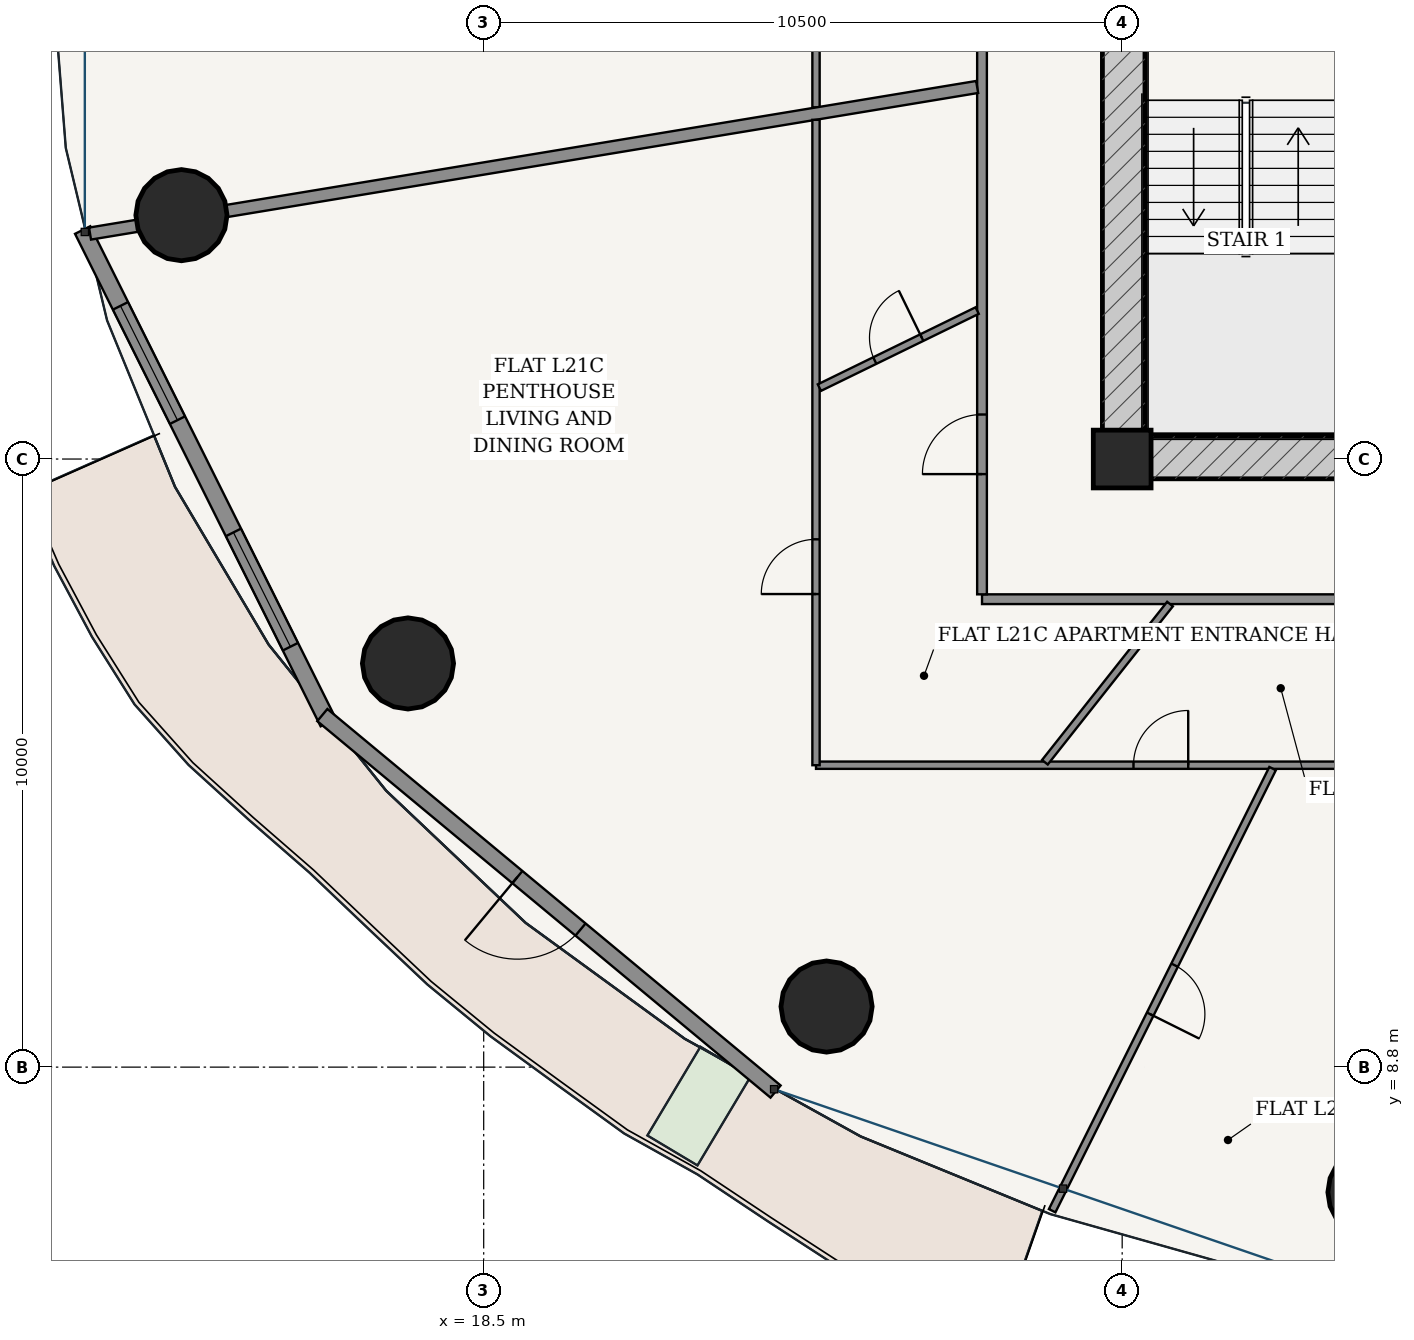
"""IFC4 building model, lengths in metres.
Left out: names, types, materials, properties, quantities, classifications, styles, units other than length and angle.
Written with IfcOpenShell. Run it as: python <this file> out.ifc"""

import sys

from ifc_helpers import new_model, si_unit, direction, frame, frame_2d, origin, origin_2d, place, context, subcontext, project, spatial, rectangle, hollow_circle, extrude, source, transform, mapped, element, fill, save


model = new_model("IFC4")
c1 = context("Model", 3, precision=1e-05, world=origin(), true_north=direction((-0.2419218956, 0.970295726276)))
c2 = subcontext(c1, "Body", "Model", "MODEL_VIEW")
j1 = project(units=[si_unit("LENGTHUNIT", "METRE"), si_unit("PLANEANGLEUNIT", "RADIAN")], contexts=[c1])
p1 = place(None, origin())
s1 = spatial("IfcSite", under=j1, at=p1, CompositionType="ELEMENT")
p2 = place(p1, origin())
s2 = spatial("IfcBuilding", under=s1, at=p2, CompositionType="ELEMENT")
p3 = place(p2, frame((0.0, 0.0, 83.4)))
s3 = spatial("IfcBuildingStorey", under=s2, at=p3, CompositionType="ELEMENT", Elevation=83.4)
p4 = place(p3, frame((29.0, 18.8, 0.0), z_axis=(0.0, 0.0, 1.0), x_axis=(1.0, 0.0, 0.0)))
e1 = element("IfcColumn", 1, at=p4, inside=s3, PredefinedType="COLUMN", context=c2, shape_type="SweptSolid", body=[
    extrude(rectangle(XDim=0.95, YDim=0.95, at=origin_2d()), origin(), (0.0, 0.0, 1.0), 3.6),
])
p5 = place(p3, frame((28.675, 18.825, 0.0), z_axis=(0.0, 0.0, 1.0), x_axis=(1.0, 0.0, 0.0)))
e2 = element("IfcWall", 2, at=p5, inside=s3, PredefinedType="SHEAR", context=c2, shape_type="SweptSolid", body=[
    extrude(rectangle(XDim=18.65, YDim=0.7, at=frame_2d((9.325, 0.0))), origin(), (0.0, 0.0, 1.0), 3.325),
])
p6 = place(p5, frame((7.577, 0.0, 0.0)))
e3 = element("IfcOpeningElement", 3, at=p6, cuts=e2, PredefinedType="OPENING", context=c2, shape_type="SweptSolid", body=[
    extrude(rectangle(XDim=0.85, YDim=2.1, at=frame_2d((0.425, 1.05))), frame((0.0, 0.36, 0.0), z_axis=(0.0, -1.0, 0.0), x_axis=(1.0, 0.0, 0.0)), (0.0, 0.0, 1.0), 0.72),
])
p7 = place(p5, frame((10.623, 0.0, 0.0)))
e4 = element("IfcOpeningElement", 4, at=p7, cuts=e2, PredefinedType="OPENING", context=c2, shape_type="SweptSolid", body=[
    extrude(rectangle(XDim=0.85, YDim=2.1, at=frame_2d((0.425, 1.05))), frame((0.0, 0.36, 0.0), z_axis=(0.0, -1.0, 0.0), x_axis=(1.0, 0.0, 0.0)), (0.0, 0.0, 1.0), 0.72),
])
p8 = place(p3, frame((29.025, 19.175, 0.0), z_axis=(0.0, 0.0, 1.0), x_axis=(0.0, 1.0, 0.0)))
e5 = element("IfcWall", 5, at=p8, inside=s3, PredefinedType="SHEAR", context=c2, shape_type="SweptSolid", body=[
    extrude(rectangle(XDim=15.25, YDim=0.7, at=frame_2d((7.625, 0.0))), origin(), (0.0, 0.0, 1.0), 3.325),
])
p9 = place(p8, frame((9.875, 0.0, 0.0)))
e6 = element("IfcOpeningElement", 6, at=p9, cuts=e5, PredefinedType="OPENING", context=c2, shape_type="SweptSolid", body=[
    extrude(rectangle(XDim=1.5, YDim=2.2, at=frame_2d((0.75, 1.1))), frame((0.0, 0.36, 0.0), z_axis=(0.0, -1.0, 0.0), x_axis=(1.0, 0.0, 0.0)), (0.0, 0.0, 1.0), 0.72),
])
for number, where, z_axis, x_axis in (
    (7, (13.529, 22.81, 0.0), (0.0, 0.0, 1.0), (1.0, 0.0, 0.0)),
    (8, (17.255, 15.438, 0.0), (0.0, 0.0, 1.0), (1.0, 0.0, 0.0)),
    (9, (24.138, 9.796, 0.0), (0.0, 0.0, 1.0), (1.0, 0.0, 0.0)),
    (10, (33.133, 6.743, 0.0), (0.0, 0.0, 1.0), (1.0, 0.0, 0.0)),
):
    element("IfcColumn", number, at=place(p3, frame(where, z_axis=z_axis, x_axis=x_axis)), inside=s3, PredefinedType="COLUMN", context=c2, shape_type="SweptSolid", body=[
        extrude(hollow_circle(Radius=0.75, WallThickness=0.045, at=origin_2d()), origin(), (0.0, 0.0, 1.0), 3.6),
    ])
p10 = place(p3, frame((11.905, 22.566, 0.0), z_axis=(0.0, 0.0, 1.0), x_axis=(0.446274562077, -0.894896091869, 0.0)))
e11 = element("IfcWall", 11, at=p10, inside=s3, PredefinedType="SOLIDWALL", context=c2, shape_type="SweptSolid", body=[
    extrude(rectangle(XDim=9.05, YDim=0.28, at=frame_2d((4.525, 0.0))), origin(), (0.0, 0.0, 1.0), 3.325),
])
p11 = place(p10, frame((1.394, 0.0, 0.85)))
e12 = element("IfcOpeningElement", 12, at=p11, cuts=e11, PredefinedType="OPENING", context=c2, shape_type="SweptSolid", body=[
    extrude(rectangle(XDim=2.1, YDim=1.95, at=frame_2d((1.05, 0.975))), frame((0.0, 0.15, 0.0), z_axis=(0.0, -1.0, 0.0), x_axis=(1.0, 0.0, 0.0)), (0.0, 0.0, 1.0), 0.3),
])
p12 = place(p10, frame((5.557, 0.0, 0.85)))
e13 = element("IfcOpeningElement", 13, at=p12, cuts=e11, PredefinedType="OPENING", context=c2, shape_type="SweptSolid", body=[
    extrude(rectangle(XDim=2.1, YDim=1.95, at=frame_2d((1.05, 0.975))), frame((0.0, 0.15, 0.0), z_axis=(0.0, -1.0, 0.0), x_axis=(1.0, 0.0, 0.0)), (0.0, 0.0, 1.0), 0.3),
])
p13 = place(p3, frame((15.846, 14.59, 0.0), z_axis=(0.0, 0.0, 1.0), x_axis=(0.769254958887, -0.638941944333, 0.0)))
e14 = element("IfcWall", 14, at=p13, inside=s3, PredefinedType="SOLIDWALL", context=c2, shape_type="SweptSolid", body=[
    extrude(rectangle(XDim=9.69, YDim=0.26, at=frame_2d((4.845, 0.0))), origin(), (0.0, 0.0, 1.0), 3.325),
])
p14 = place(p13, frame((4.17, 0.0, 0.0)))
e15 = element("IfcOpeningElement", 15, at=p14, cuts=e14, PredefinedType="OPENING", context=c2, shape_type="SweptSolid", body=[
    extrude(rectangle(XDim=1.35, YDim=2.2, at=frame_2d((0.675, 1.1))), frame((0.0, 0.14, 0.0), z_axis=(0.0, -1.0, 0.0), x_axis=(1.0, 0.0, 0.0)), (0.0, 0.0, 1.0), 0.28),
])
p15 = place(p3, frame((26.695, 16.495, 0.0), z_axis=(0.0, 0.0, 1.0), x_axis=(1.0, 0.0, 0.0)))
e16 = element("IfcWall", 16, at=p15, inside=s3, PredefinedType="PARTITIONING", context=c2, shape_type="SweptSolid", body=[
    extrude(rectangle(XDim=22.61, YDim=0.16, at=frame_2d((11.305, 0.0))), origin(), (0.0, 0.0, 1.0), 2.767),
])
p16 = place(p3, frame((26.695, 16.575, 0.0), z_axis=(0.0, 0.0, 1.0), x_axis=(0.0, 1.0, 0.0)))
e17 = element("IfcWall", 17, at=p16, inside=s3, PredefinedType="PARTITIONING", context=c2, shape_type="SweptSolid", body=[
    extrude(rectangle(XDim=20.45, YDim=0.16, at=frame_2d((10.225, 0.0))), origin(), (0.0, 0.0, 1.0), 2.767),
])
p17 = place(p16, frame((1.977, 0.0, 0.0)))
e18 = element("IfcOpeningElement", 18, at=p17, cuts=e17, PredefinedType="OPENING", context=c2, shape_type="SweptSolid", body=[
    extrude(rectangle(XDim=0.98, YDim=2.2, at=frame_2d((0.49, 1.1))), frame((0.0, 0.09, 0.0), z_axis=(0.0, -1.0, 0.0), x_axis=(1.0, 0.0, 0.0)), (0.0, 0.0, 1.0), 0.18),
])
p18 = place(p3, frame((23.965, 24.583, 0.0), z_axis=(0.0, 0.0, 1.0), x_axis=(0.0, 1.0, 0.0)))
e19 = element("IfcWall", 19, at=p18, inside=s3, PredefinedType="PARTITIONING", context=c2, shape_type="SweptSolid", body=[
    extrude(rectangle(XDim=15.252, YDim=0.12, at=frame_2d((7.626, 0.0))), origin(), (0.0, 0.0, 1.0), 2.767),
])
p19 = place(p3, frame((26.615, 24.918, 0.0), z_axis=(0.0, 0.0, 1.0), x_axis=(-0.986618789677, -0.163044054958, 0.0)))
e20 = element("IfcWall", 20, at=p19, inside=s3, PredefinedType="PARTITIONING", context=c2, shape_type="SweptSolid", body=[
    extrude(rectangle(XDim=14.787, YDim=0.2, at=frame_2d((7.393, 0.0))), origin(), (0.0, 0.0, 1.0), 2.767),
])
p20 = place(p3, frame((41.019, 13.765, 0.0), z_axis=(0.0, 0.0, 1.0), x_axis=(-1.0, 0.0, 0.0)))
e21 = element("IfcWall", 21, at=p20, inside=s3, PredefinedType="PARTITIONING", context=c2, shape_type="SweptSolid", body=[
    extrude(rectangle(XDim=17.054, YDim=0.12, at=frame_2d((8.527, 0.0))), origin(), (0.0, 0.0, 1.0), 2.767),
])
p21 = place(p20, frame((10.933, 0.0, 0.0)))
e22 = element("IfcOpeningElement", 22, at=p21, cuts=e21, PredefinedType="OPENING", context=c2, shape_type="SweptSolid", body=[
    extrude(rectangle(XDim=0.9, YDim=2.15, at=frame_2d((0.45, 1.075))), frame((0.0, 0.07, 0.0), z_axis=(0.0, -1.0, 0.0), x_axis=(1.0, 0.0, 0.0)), (0.0, 0.0, 1.0), 0.14),
])
p22 = place(p3, frame((23.965, 13.765, 0.0), z_axis=(0.0, 0.0, 1.0), x_axis=(0.0, 1.0, 0.0)))
e23 = element("IfcWall", 23, at=p22, inside=s3, PredefinedType="PARTITIONING", context=c2, shape_type="SweptSolid", body=[
    extrude(rectangle(XDim=10.614, YDim=0.12, at=frame_2d((5.307, 0.0))), origin(), (0.0, 0.0, 1.0), 2.767),
])
p23 = place(p22, frame((2.815, 0.0, 0.0)))
e24 = element("IfcOpeningElement", 24, at=p23, cuts=e23, PredefinedType="OPENING", context=c2, shape_type="SweptSolid", body=[
    extrude(rectangle(XDim=0.9, YDim=2.15, at=frame_2d((0.45, 1.075))), frame((0.0, 0.07, 0.0), z_axis=(0.0, -1.0, 0.0), x_axis=(1.0, 0.0, 0.0)), (0.0, 0.0, 1.0), 0.14),
])
p24 = place(p3, frame((31.474, 13.709, 0.0), z_axis=(0.0, 0.0, 1.0), x_axis=(-0.446179583353, -0.894943450392, 0.0)))
e25 = element("IfcWall", 25, at=p24, inside=s3, PredefinedType="PARTITIONING", context=c2, shape_type="SweptSolid", body=[
    extrude(rectangle(XDim=8.125, YDim=0.12, at=frame_2d((4.062, 0.0))), origin(), (0.0, 0.0, 1.0), 2.767),
])
p25 = place(p24, frame((3.612, 0.0, 0.0)))
e26 = element("IfcOpeningElement", 26, at=p25, cuts=e25, PredefinedType="OPENING", context=c2, shape_type="SweptSolid", body=[
    extrude(rectangle(XDim=0.9, YDim=2.15, at=frame_2d((0.45, 1.075))), frame((0.0, 0.07, 0.0), z_axis=(0.0, -1.0, 0.0), x_axis=(1.0, 0.0, 0.0)), (0.0, 0.0, 1.0), 0.14),
])
p26 = place(p3, frame((26.615, 21.241, 0.0), z_axis=(0.0, 0.0, 1.0), x_axis=(-0.898615592274, -0.438736842906, 0.0)))
e27 = element("IfcWall", 27, at=p26, inside=s3, PredefinedType="PARTITIONING", context=c2, shape_type="SweptSolid", body=[
    extrude(rectangle(XDim=2.887, YDim=0.12, at=frame_2d((1.443, 0.0))), origin(), (0.0, 0.0, 1.0), 3.325),
])
p27 = place(p26, frame((1.013, 0.0, 0.0)))
e28 = element("IfcOpeningElement", 28, at=p27, cuts=e27, PredefinedType="OPENING", context=c2, shape_type="SweptSolid", body=[
    extrude(rectangle(XDim=0.86, YDim=2.15, at=frame_2d((0.43, 1.075))), frame((0.0, 0.07, 0.0), z_axis=(0.0, -1.0, 0.0), x_axis=(1.0, 0.0, 0.0)), (0.0, 0.0, 1.0), 0.14),
])
p28 = place(p3, frame((29.787, 16.415, 0.0), z_axis=(0.0, 0.0, 1.0), x_axis=(-0.62033143471, -0.784339793145, 0.0)))
e29 = element("IfcWall", 29, at=p28, inside=s3, PredefinedType="PARTITIONING", context=c2, shape_type="SweptSolid", body=[
    extrude(rectangle(XDim=3.317, YDim=0.12, at=frame_2d((1.658, 0.0))), origin(), (0.0, 0.0, 1.0), 3.004),
])
m1 = source(origin(), c2, "Body", "SweptSolid", [
    extrude(rectangle(XDim=2.1, YDim=1.95, at=frame_2d((1.05, 0.975))), frame((0.0, 0.03, 0.0), z_axis=(0.0, -1.0, 0.0), x_axis=(1.0, 0.0, 0.0)), (0.0, 0.0, 1.0), 0.06),
])
p29 = place(p11, origin())
e30 = element("IfcWindow", 30, at=p29, inside=s3, PartitioningType="SINGLE_PANEL", PredefinedType="WINDOW", context=c2, shape_type="MappedRepresentation", body=[
    mapped(m1, transform((0.0, 0.0, 0.0), scale=1.0)),
])
fill(e12, e30)
p30 = place(p12, origin())
e31 = element("IfcWindow", 31, at=p30, inside=s3, PartitioningType="SINGLE_PANEL", PredefinedType="WINDOW", context=c2, shape_type="MappedRepresentation", body=[
    mapped(m1, transform((0.0, 0.0, 0.0), scale=1.0)),
])
fill(e13, e31)
m2 = source(origin(), c2, "Body", "SweptSolid", [
    extrude(rectangle(XDim=1.35, YDim=2.2, at=frame_2d((0.675, 1.1))), frame((0.0, 0.025, 0.0), z_axis=(0.0, -1.0, 0.0), x_axis=(1.0, 0.0, 0.0)), (0.0, 0.0, 1.0), 0.05),
])
p31 = place(p14, frame((1.35, 0.0, 0.0), z_axis=(0.0, 0.0, 1.0), x_axis=(-1.0, 0.0, 0.0)))
e32 = element("IfcDoor", 32, at=p31, inside=s3, OperationType="SINGLE_SWING_RIGHT", PredefinedType="DOOR", context=c2, shape_type="MappedRepresentation", body=[
    mapped(m2, transform((0.0, 0.0, 0.0), scale=1.0)),
])
fill(e15, e32)
m3 = source(origin(), c2, "Body", "SweptSolid", [
    extrude(rectangle(XDim=0.98, YDim=2.2, at=frame_2d((0.49, 1.1))), frame((0.0, 0.025, 0.0), z_axis=(0.0, -1.0, 0.0), x_axis=(1.0, 0.0, 0.0)), (0.0, 0.0, 1.0), 0.05),
])
p32 = place(p17, origin())
e33 = element("IfcDoor", 33, at=p32, inside=s3, OperationType="SINGLE_SWING_LEFT", PredefinedType="DOOR", context=c2, shape_type="MappedRepresentation", body=[
    mapped(m3, transform((0.0, 0.0, 0.0), scale=1.0)),
])
fill(e18, e33)
m4 = source(origin(), c2, "Body", "SweptSolid", [
    extrude(rectangle(XDim=0.86, YDim=2.15, at=frame_2d((0.43, 1.075))), frame((0.0, 0.025, 0.0), z_axis=(0.0, -1.0, 0.0), x_axis=(1.0, 0.0, 0.0)), (0.0, 0.0, 1.0), 0.05),
])
p33 = place(p27, frame((0.86, 0.0, 0.0), z_axis=(0.0, 0.0, 1.0), x_axis=(-1.0, 0.0, 0.0)))
e34 = element("IfcDoor", 34, at=p33, inside=s3, OperationType="SINGLE_SWING_RIGHT", PredefinedType="DOOR", context=c2, shape_type="MappedRepresentation", body=[
    mapped(m4, transform((0.0, 0.0, 0.0), scale=1.0)),
])
fill(e28, e34)
m5 = source(origin(), c2, "Body", "SweptSolid", [
    extrude(rectangle(XDim=0.9, YDim=2.15, at=frame_2d((0.45, 1.075))), frame((0.0, 0.025, 0.0), z_axis=(0.0, -1.0, 0.0), x_axis=(1.0, 0.0, 0.0)), (0.0, 0.0, 1.0), 0.05),
])
p34 = place(p23, origin())
e35 = element("IfcDoor", 35, at=p34, inside=s3, OperationType="SINGLE_SWING_LEFT", PredefinedType="DOOR", context=c2, shape_type="MappedRepresentation", body=[
    mapped(m5, transform((0.0, 0.0, 0.0), scale=1.0)),
])
fill(e24, e35)
p35 = place(p21, frame((0.9, 0.0, 0.0), z_axis=(0.0, 0.0, 1.0), x_axis=(-1.0, 0.0, 0.0)))
e36 = element("IfcDoor", 36, at=p35, inside=s3, OperationType="SINGLE_SWING_RIGHT", PredefinedType="DOOR", context=c2, shape_type="MappedRepresentation", body=[
    mapped(m5, transform((0.0, 0.0, 0.0), scale=1.0)),
])
fill(e22, e36)
p36 = place(p25, origin())
e37 = element("IfcDoor", 37, at=p36, inside=s3, OperationType="SINGLE_SWING_RIGHT", PredefinedType="DOOR", context=c2, shape_type="MappedRepresentation", body=[
    mapped(m5, transform((0.0, 0.0, 0.0), scale=1.0)),
])
fill(e26, e37)
save(model, sys.argv[1])
